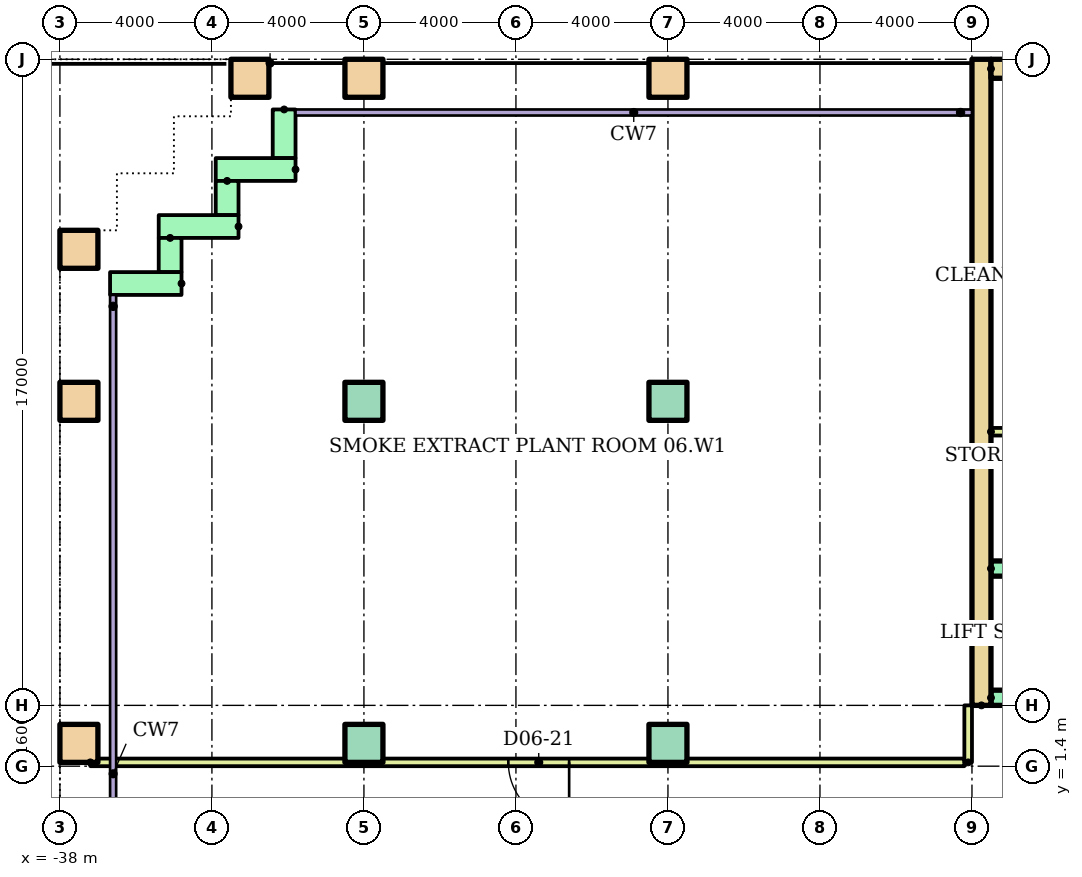
"""IFC4 building model, lengths in metres.
Left out: names, types, materials, properties, quantities, classifications, styles, units other than length and angle.
Written with IfcOpenShell. Run it as: python <this file> out.ifc"""

import sys

from ifc_helpers import new_model, si_unit, direction, frame, frame_2d, origin, origin_2d, place, context, subcontext, project, spatial, rectangle, hollow_rectangle, extrude, element, fill, save


model = new_model("IFC4")
c1 = context("Model", 3, precision=1e-05, world=origin(), true_north=direction((0.0, 1.0)))
c2 = subcontext(c1, "Body", "Model", "MODEL_VIEW")
j1 = project(units=[si_unit("LENGTHUNIT", "METRE"), si_unit("PLANEANGLEUNIT", "RADIAN")], contexts=[c1])
p1 = place(None, origin())
s1 = spatial("IfcSite", under=j1, at=p1, CompositionType="ELEMENT")
p2 = place(p1, origin())
s2 = spatial("IfcBuilding", under=s1, at=p2, CompositionType="ELEMENT")
p3 = place(p2, frame((0.0, 0.0, 26.0)))
s3 = spatial("IfcBuildingStorey", under=s2, at=p3, CompositionType="ELEMENT", Elevation=26.0)
p4 = place(p3, frame((-37.5, 2.0, 0.0)))
e1 = element("IfcColumn", 1, at=p4, inside=s3, PredefinedType="COLUMN", context=c2, shape_type="SweptSolid", body=[
    extrude(hollow_rectangle(XDim=1.0, YDim=1.0, WallThickness=0.05, at=origin_2d()), origin(), (0.0, 0.0, 1.0), 3.9),
])
for number, where in (
    (2, (-30.0, 2.0, 0.0)),
    (3, (-22.0, 2.0, 0.0)),
):
    element("IfcColumn", number, at=place(p3, frame(where)), inside=s3, PredefinedType="COLUMN", context=c2, shape_type="SweptSolid", body=[
        extrude(rectangle(XDim=1.0, YDim=1.0, at=origin_2d()), origin(), (0.0, 0.0, 1.0), 3.9),
    ])
p5 = place(p3, frame((-37.5, 11.0, 0.0)))
e4 = element("IfcColumn", 4, at=p5, inside=s3, PredefinedType="COLUMN", context=c2, shape_type="SweptSolid", body=[
    extrude(hollow_rectangle(XDim=1.0, YDim=1.0, WallThickness=0.05, at=origin_2d()), origin(), (0.0, 0.0, 1.0), 3.9),
])
for number, where in (
    (5, (-30.0, 11.0, 0.0)),
    (6, (-22.0, 11.0, 0.0)),
):
    element("IfcColumn", number, at=place(p3, frame(where)), inside=s3, PredefinedType="COLUMN", context=c2, shape_type="SweptSolid", body=[
        extrude(rectangle(XDim=1.0, YDim=1.0, at=origin_2d()), origin(), (0.0, 0.0, 1.0), 3.9),
    ])
for number, where in (
    (7, (-37.5, 15.0, 0.0)),
    (8, (-33.0, 19.5, 0.0)),
    (9, (-30.0, 19.5, 0.0)),
    (10, (-22.0, 19.5, 0.0)),
):
    element("IfcColumn", number, at=place(p3, frame(where)), inside=s3, PredefinedType="COLUMN", context=c2, shape_type="SweptSolid", body=[
        extrude(hollow_rectangle(XDim=1.0, YDim=1.0, WallThickness=0.05, at=origin_2d()), origin(), (0.0, 0.0, 1.0), 3.9),
    ])
p6 = place(p3, frame((-32.1, 18.68, 0.0), z_axis=(0.0, 0.0, 1.0), x_axis=(0.0, -1.0, 0.0)))
e11 = element("IfcWall", 11, at=p6, inside=s3, PredefinedType="STANDARD", context=c2, shape_type="SweptSolid", body=[
    extrude(rectangle(XDim=1.28, YDim=0.6, at=frame_2d((0.64, 0.0))), origin(), (0.0, 0.0, 1.0), 3.6),
])
p7 = place(p3, frame((-31.8, 17.1, 0.0), z_axis=(0.0, 0.0, 1.0), x_axis=(-1.0, 0.0, 0.0)))
e12 = element("IfcWall", 12, at=p7, inside=s3, PredefinedType="STANDARD", context=c2, shape_type="SweptSolid", body=[
    extrude(rectangle(XDim=2.1, YDim=0.6, at=frame_2d((1.05, 0.0))), origin(), (0.0, 0.0, 1.0), 3.6),
])
p8 = place(p3, frame((-33.6, 16.8, 0.0), z_axis=(0.0, 0.0, 1.0), x_axis=(0.0, -1.0, 0.0)))
e13 = element("IfcWall", 13, at=p8, inside=s3, PredefinedType="STANDARD", context=c2, shape_type="SweptSolid", body=[
    extrude(rectangle(XDim=0.9, YDim=0.6, at=frame_2d((0.45, 0.0))), origin(), (0.0, 0.0, 1.0), 3.6),
])
p9 = place(p3, frame((-33.3, 15.6, 0.0), z_axis=(0.0, 0.0, 1.0), x_axis=(-1.0, 0.0, 0.0)))
e14 = element("IfcWall", 14, at=p9, inside=s3, PredefinedType="STANDARD", context=c2, shape_type="SweptSolid", body=[
    extrude(rectangle(XDim=2.1, YDim=0.6, at=frame_2d((1.05, 0.0))), origin(), (0.0, 0.0, 1.0), 3.6),
])
p10 = place(p3, frame((-35.1, 15.3, 0.0), z_axis=(0.0, 0.0, 1.0), x_axis=(0.0, -1.0, 0.0)))
e15 = element("IfcWall", 15, at=p10, inside=s3, PredefinedType="STANDARD", context=c2, shape_type="SweptSolid", body=[
    extrude(rectangle(XDim=0.9, YDim=0.6, at=frame_2d((0.45, 0.0))), origin(), (0.0, 0.0, 1.0), 3.6),
])
p11 = place(p3, frame((-34.8, 14.1, 0.0), z_axis=(0.0, 0.0, 1.0), x_axis=(-1.0, 0.0, 0.0)))
e16 = element("IfcWall", 16, at=p11, inside=s3, PredefinedType="STANDARD", context=c2, shape_type="SweptSolid", body=[
    extrude(rectangle(XDim=1.88, YDim=0.6, at=frame_2d((0.94, 0.0))), origin(), (0.0, 0.0, 1.0), 3.6),
])
p12 = place(p3, frame((-13.75, 3.0, 0.0), z_axis=(0.0, 0.0, 1.0), x_axis=(0.0, 1.0, 0.0)))
e17 = element("IfcWall", 17, at=p12, inside=s3, PredefinedType="SHEAR", context=c2, shape_type="SweptSolid", body=[
    extrude(rectangle(XDim=17.0, YDim=0.5, at=frame_2d((8.5, 0.0))), origin(), (0.0, 0.0, 1.0), 3.6),
])
p13 = place(p3, frame((-13.5, 19.75, 0.0)))
e18 = element("IfcWall", 18, at=p13, inside=s3, PredefinedType="SHEAR", context=c2, shape_type="SweptSolid", body=[
    extrude(rectangle(XDim=27.0, YDim=0.5, at=frame_2d((13.5, 0.0))), origin(), (0.0, 0.0, 1.0), 3.6),
])
p14 = place(p3, frame((-13.5, 3.2, 0.0)))
e19 = element("IfcWall", 19, at=p14, inside=s3, PredefinedType="SHEAR", context=c2, shape_type="SweptSolid", body=[
    extrude(rectangle(XDim=27.0, YDim=0.4, at=frame_2d((13.5, 0.0))), origin(), (0.0, 0.0, 1.0), 3.6),
])
p15 = place(p14, frame((6.861, 0.0, 0.0)))
e20 = element("IfcOpeningElement", 20, at=p15, cuts=e19, PredefinedType="OPENING", context=c2, shape_type="SweptSolid", body=[
    extrude(rectangle(XDim=1.1, YDim=2.1, at=frame_2d((0.55, 1.05))), frame((0.0, 0.21, 0.0), z_axis=(0.0, -1.0, 0.0), x_axis=(1.0, 0.0, 0.0)), (0.0, 0.0, 1.0), 0.42),
])
p16 = place(p14, frame((9.906, 0.0, 0.0)))
e21 = element("IfcOpeningElement", 21, at=p16, cuts=e19, PredefinedType="OPENING", context=c2, shape_type="SweptSolid", body=[
    extrude(rectangle(XDim=1.1, YDim=2.1, at=frame_2d((0.55, 1.05))), frame((0.0, 0.21, 0.0), z_axis=(0.0, -1.0, 0.0), x_axis=(1.0, 0.0, 0.0)), (0.0, 0.0, 1.0), 0.42),
])
p17 = place(p14, frame((15.994, 0.0, 0.0)))
e22 = element("IfcOpeningElement", 22, at=p17, cuts=e19, PredefinedType="OPENING", context=c2, shape_type="SweptSolid", body=[
    extrude(rectangle(XDim=1.1, YDim=2.1, at=frame_2d((0.55, 1.05))), frame((0.0, 0.21, 0.0), z_axis=(0.0, -1.0, 0.0), x_axis=(1.0, 0.0, 0.0)), (0.0, 0.0, 1.0), 0.42),
])
p18 = place(p14, frame((19.039, 0.0, 0.0)))
e23 = element("IfcOpeningElement", 23, at=p18, cuts=e19, PredefinedType="OPENING", context=c2, shape_type="SweptSolid", body=[
    extrude(rectangle(XDim=1.1, YDim=2.1, at=frame_2d((0.55, 1.05))), frame((0.0, 0.21, 0.0), z_axis=(0.0, -1.0, 0.0), x_axis=(1.0, 0.0, 0.0)), (0.0, 0.0, 1.0), 0.42),
])
p19 = place(p14, frame((12.6, 0.0, 0.0)))
e24 = element("IfcOpeningElement", 24, at=p19, cuts=e19, PredefinedType="OPENING", context=c2, shape_type="SweptSolid", body=[
    extrude(rectangle(XDim=1.8, YDim=2.1, at=frame_2d((0.9, 1.05))), frame((0.0, 0.21, 0.0), z_axis=(0.0, -1.0, 0.0), x_axis=(1.0, 0.0, 0.0)), (0.0, 0.0, 1.0), 0.42),
])
p20 = place(p3, frame((-13.5, 6.6, 0.0)))
e25 = element("IfcWall", 25, at=p20, inside=s3, PredefinedType="SHEAR", context=c2, shape_type="SweptSolid", body=[
    extrude(rectangle(XDim=11.978, YDim=0.4, at=frame_2d((5.989, 0.0))), origin(), (0.0, 0.0, 1.0), 3.6),
])
p21 = place(p3, frame((-13.5, 10.2, 0.0)))
e26 = element("IfcWall", 26, at=p21, inside=s3, PredefinedType="PARTITIONING", context=c2, shape_type="SweptSolid", body=[
    extrude(rectangle(XDim=3.9, YDim=0.2, at=frame_2d((1.95, 0.0))), origin(), (0.0, 0.0, 1.0), 3.6),
])
p22 = place(p3, frame((-37.2, 1.5, 0.0)))
e27 = element("IfcWall", 27, at=p22, inside=s3, PredefinedType="PARTITIONING", context=c2, shape_type="SweptSolid", body=[
    extrude(rectangle(XDim=23.0, YDim=0.2, at=frame_2d((11.5, 0.0))), origin(), (0.0, 0.0, 1.0), 3.6),
])
p23 = place(p22, frame((11.0, 0.0, 0.0)))
e28 = element("IfcOpeningElement", 28, at=p23, cuts=e27, PredefinedType="OPENING", context=c2, shape_type="SweptSolid", body=[
    extrude(rectangle(XDim=1.6, YDim=2.4, at=frame_2d((0.8, 1.2))), frame((0.0, 0.11, 0.0), z_axis=(0.0, -1.0, 0.0), x_axis=(1.0, 0.0, 0.0)), (0.0, 0.0, 1.0), 0.22),
])
p24 = place(p3, frame((-14.1, 1.5, 0.0), z_axis=(0.0, 0.0, 1.0), x_axis=(0.0, 1.0, 0.0)))
e29 = element("IfcWall", 29, at=p24, inside=s3, PredefinedType="PARTITIONING", context=c2, shape_type="SweptSolid", body=[
    extrude(rectangle(XDim=1.5, YDim=0.2, at=frame_2d((0.75, 0.0))), origin(), (0.0, 0.0, 1.0), 3.6),
])
p25 = place(p23, frame((1.6, 0.0, 0.0), z_axis=(0.0, 0.0, 1.0), x_axis=(-1.0, 0.0, 0.0)))
e30 = element("IfcDoor", 30, at=p25, inside=s3, OperationType="DOUBLE_DOOR_SINGLE_SWING", PredefinedType="DOOR", context=c2, shape_type="SweptSolid", body=[
    extrude(rectangle(XDim=1.6, YDim=2.4, at=frame_2d((0.8, 1.2))), frame((0.0, 0.025, 0.0), z_axis=(0.0, -1.0, 0.0), x_axis=(1.0, 0.0, 0.0)), (0.0, 0.0, 1.0), 0.05),
])
fill(e28, e30)
save(model, sys.argv[1])
